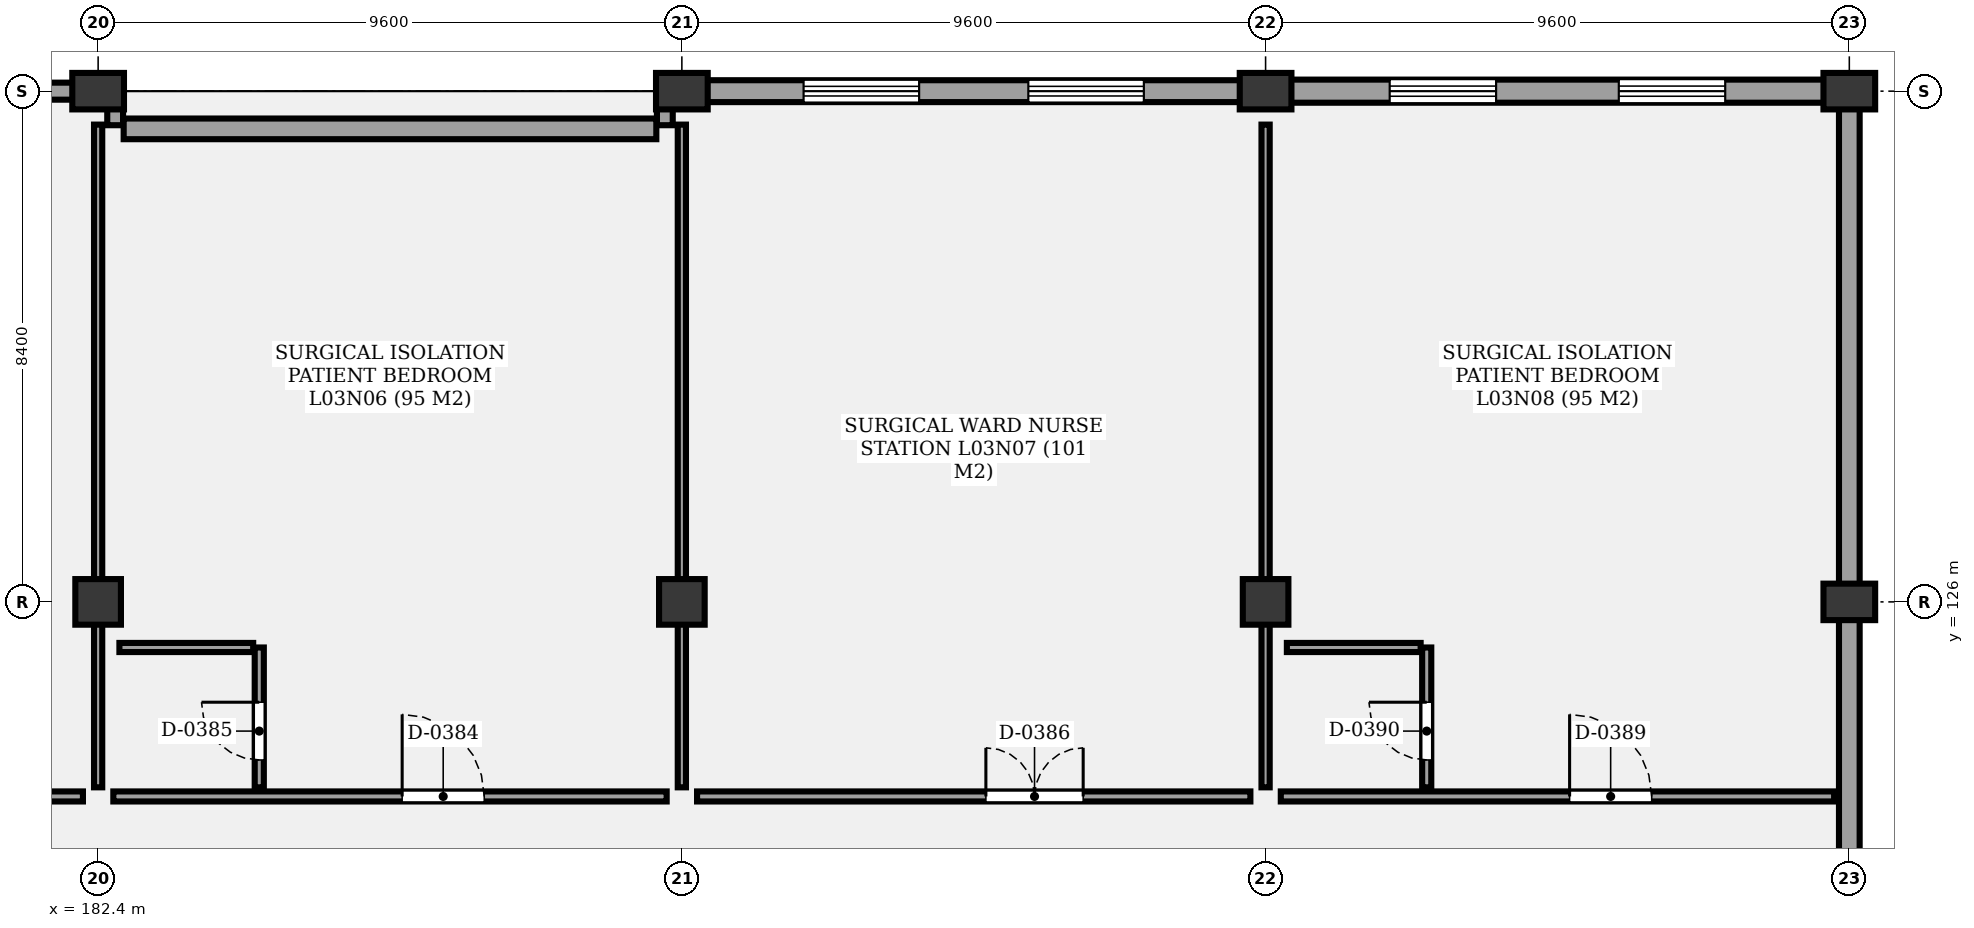
"""IFC4 building model, lengths in metres.
Left out: names, types, materials, properties, quantities, classifications, styles, units other than length and angle.
Written with IfcOpenShell. Run it as: python <this file> out.ifc"""

import sys

from ifc_helpers import new_model, si_unit, direction, frame, frame_2d, origin, origin_2d, place, context, subcontext, project, spatial, rectangle, extrude, element, fill, save


model = new_model("IFC4")
c1 = context("Model", 3, precision=1e-05, world=origin(), true_north=direction((0.0, 1.0)))
c2 = subcontext(c1, "Body", "Model", "MODEL_VIEW")
j1 = project(units=[si_unit("LENGTHUNIT", "METRE"), si_unit("PLANEANGLEUNIT", "RADIAN")], contexts=[c1])
p1 = place(None, origin())
s1 = spatial("IfcSite", under=j1, at=p1, CompositionType="ELEMENT")
p2 = place(p1, origin())
s2 = spatial("IfcBuilding", under=s1, at=p2, CompositionType="ELEMENT")
p3 = place(p2, frame((0.0, 0.0, 13.5)))
s3 = spatial("IfcBuildingStorey", under=s2, at=p3, CompositionType="ELEMENT", Elevation=13.5)
p4 = place(p3, frame((182.4, 126.0, 0.0), z_axis=(0.0, 0.0, 1.0), x_axis=(1.0, 0.0, 0.0)))
e1 = element("IfcColumn", 1, at=p4, inside=s3, PredefinedType="COLUMN", context=c2, shape_type="SweptSolid", body=[
    extrude(rectangle(XDim=0.75, YDim=0.75, at=origin_2d()), origin(), (0.0, 0.0, 1.0), 4.3),
])
p5 = place(p3, frame((182.4, 134.4, 0.0), z_axis=(0.0, 0.0, 1.0), x_axis=(1.0, 0.0, 0.0)))
e2 = element("IfcColumn", 2, at=p5, inside=s3, PredefinedType="COLUMN", context=c2, shape_type="SweptSolid", body=[
    extrude(rectangle(XDim=0.85, YDim=0.6, at=origin_2d()), origin(), (0.0, 0.0, 1.0), 4.3),
])
p6 = place(p3, frame((192.0, 126.0, 0.0), z_axis=(0.0, 0.0, 1.0), x_axis=(1.0, 0.0, 0.0)))
e3 = element("IfcColumn", 3, at=p6, inside=s3, PredefinedType="COLUMN", context=c2, shape_type="SweptSolid", body=[
    extrude(rectangle(XDim=0.75, YDim=0.75, at=origin_2d()), origin(), (0.0, 0.0, 1.0), 4.3),
])
p7 = place(p3, frame((192.0, 134.4, 0.0), z_axis=(0.0, 0.0, 1.0), x_axis=(1.0, 0.0, 0.0)))
e4 = element("IfcColumn", 4, at=p7, inside=s3, PredefinedType="COLUMN", context=c2, shape_type="SweptSolid", body=[
    extrude(rectangle(XDim=0.85, YDim=0.6, at=origin_2d()), origin(), (0.0, 0.0, 1.0), 4.3),
])
p8 = place(p3, frame((201.6, 126.0, 0.0), z_axis=(0.0, 0.0, 1.0), x_axis=(1.0, 0.0, 0.0)))
e5 = element("IfcColumn", 5, at=p8, inside=s3, PredefinedType="COLUMN", context=c2, shape_type="SweptSolid", body=[
    extrude(rectangle(XDim=0.75, YDim=0.75, at=origin_2d()), origin(), (0.0, 0.0, 1.0), 4.3),
])
for number, where, z_axis, x_axis in (
    (6, (201.6, 134.4, 0.0), (0.0, 0.0, 1.0), (1.0, 0.0, 0.0)),
    (7, (211.2, 126.0, 0.0), (0.0, 0.0, 1.0), (1.0, 0.0, 0.0)),
    (8, (211.2, 134.4, 0.0), (0.0, 0.0, 1.0), (1.0, 0.0, 0.0)),
):
    element("IfcColumn", number, at=place(p3, frame(where, z_axis=z_axis, x_axis=x_axis)), inside=s3, PredefinedType="COLUMN", context=c2, shape_type="SweptSolid", body=[
        extrude(rectangle(XDim=0.85, YDim=0.6, at=origin_2d()), origin(), (0.0, 0.0, 1.0), 4.3),
    ])
p9 = place(p3, frame((172.8, 134.4, 0.0), z_axis=(0.0, 0.0, 1.0), x_axis=(1.0, 0.0, 0.0)))
e9 = element("IfcWall", 9, at=p9, inside=s3, PredefinedType="SOLIDWALL", context=c2, shape_type="SweptSolid", body=[
    extrude(rectangle(XDim=9.6, YDim=0.28, at=frame_2d((4.8, 0.0))), origin(), (0.0, 0.0, 1.0), 3.49),
])
p10 = place(p9, frame((2.002, 0.0, 0.85)))
e10 = element("IfcOpeningElement", 10, at=p10, cuts=e9, PredefinedType="OPENING", context=c2, shape_type="SweptSolid", body=[
    extrude(rectangle(XDim=1.9, YDim=1.2, at=frame_2d((0.95, 0.6))), frame((0.0, 0.15, 0.0), z_axis=(0.0, -1.0, 0.0), x_axis=(1.0, 0.0, 0.0)), (0.0, 0.0, 1.0), 0.3),
])
p11 = place(p9, frame((5.698, 0.0, 0.85)))
e11 = element("IfcOpeningElement", 11, at=p11, cuts=e9, PredefinedType="OPENING", context=c2, shape_type="SweptSolid", body=[
    extrude(rectangle(XDim=1.9, YDim=1.2, at=frame_2d((0.95, 0.6))), frame((0.0, 0.15, 0.0), z_axis=(0.0, -1.0, 0.0), x_axis=(1.0, 0.0, 0.0)), (0.0, 0.0, 1.0), 0.3),
])
for number, where, z_axis, x_axis in (
    (12, (182.68, 134.2, 0.0), (0.0, 0.0, 1.0), (0.0, -1.0, 0.0)),
    (13, (191.72, 134.2, 0.0), (0.0, 0.0, 1.0), (0.0, -1.0, 0.0)),
):
    element("IfcWall", number, at=place(p3, frame(where, z_axis=z_axis, x_axis=x_axis)), inside=s3, PredefinedType="SOLIDWALL", context=c2, shape_type="SweptSolid", body=[
        extrude(rectangle(XDim=0.36, YDim=0.26, at=frame_2d((0.18, 0.0))), origin(), (0.0, 0.0, 1.0), 3.49),
    ])
p12 = place(p3, frame((182.82, 133.78, 0.0), z_axis=(0.0, 0.0, 1.0), x_axis=(1.0, 0.0, 0.0)))
e14 = element("IfcWall", 14, at=p12, inside=s3, PredefinedType="SOLIDWALL", context=c2, shape_type="SweptSolid", body=[
    extrude(rectangle(XDim=8.76, YDim=0.34, at=frame_2d((4.38, 0.0))), origin(), (0.0, 0.0, 1.0), 3.49),
])
p13 = place(p3, frame((192.0, 134.4, 0.0), z_axis=(0.0, 0.0, 1.0), x_axis=(1.0, 0.0, 0.0)))
e15 = element("IfcWall", 15, at=p13, inside=s3, PredefinedType="SOLIDWALL", context=c2, shape_type="SweptSolid", body=[
    extrude(rectangle(XDim=9.6, YDim=0.36, at=frame_2d((4.8, 0.0))), origin(), (0.0, 0.0, 1.0), 3.49),
])
p14 = place(p13, frame((2.002, 0.0, 0.85)))
e16 = element("IfcOpeningElement", 16, at=p14, cuts=e15, PredefinedType="OPENING", context=c2, shape_type="SweptSolid", body=[
    extrude(rectangle(XDim=1.9, YDim=1.2, at=frame_2d((0.95, 0.6))), frame((0.0, 0.19, 0.0), z_axis=(0.0, -1.0, 0.0), x_axis=(1.0, 0.0, 0.0)), (0.0, 0.0, 1.0), 0.38),
])
p15 = place(p13, frame((5.698, 0.0, 0.85)))
e17 = element("IfcOpeningElement", 17, at=p15, cuts=e15, PredefinedType="OPENING", context=c2, shape_type="SweptSolid", body=[
    extrude(rectangle(XDim=1.9, YDim=1.2, at=frame_2d((0.95, 0.6))), frame((0.0, 0.19, 0.0), z_axis=(0.0, -1.0, 0.0), x_axis=(1.0, 0.0, 0.0)), (0.0, 0.0, 1.0), 0.38),
])
p16 = place(p3, frame((201.6, 134.4, 0.0), z_axis=(0.0, 0.0, 1.0), x_axis=(1.0, 0.0, 0.0)))
e18 = element("IfcWall", 18, at=p16, inside=s3, PredefinedType="SOLIDWALL", context=c2, shape_type="SweptSolid", body=[
    extrude(rectangle(XDim=9.6, YDim=0.38, at=frame_2d((4.8, 0.0))), origin(), (0.0, 0.0, 1.0), 3.49),
])
p17 = place(p16, frame((2.041, 0.0, 0.85)))
e19 = element("IfcOpeningElement", 19, at=p17, cuts=e18, PredefinedType="OPENING", context=c2, shape_type="SweptSolid", body=[
    extrude(rectangle(XDim=1.75, YDim=1.2, at=frame_2d((0.875, 0.6))), frame((0.0, 0.2, 0.0), z_axis=(0.0, -1.0, 0.0), x_axis=(1.0, 0.0, 0.0)), (0.0, 0.0, 1.0), 0.4),
])
p18 = place(p16, frame((5.809, 0.0, 0.85)))
e20 = element("IfcOpeningElement", 20, at=p18, cuts=e18, PredefinedType="OPENING", context=c2, shape_type="SweptSolid", body=[
    extrude(rectangle(XDim=1.75, YDim=1.2, at=frame_2d((0.875, 0.6))), frame((0.0, 0.2, 0.0), z_axis=(0.0, -1.0, 0.0), x_axis=(1.0, 0.0, 0.0)), (0.0, 0.0, 1.0), 0.4),
])
p19 = place(p3, frame((211.2, 134.24, 0.0), z_axis=(0.0, 0.0, 1.0), x_axis=(0.0, -1.0, 0.0)))
e21 = element("IfcWall", 21, at=p19, inside=s3, PredefinedType="SOLIDWALL", context=c2, shape_type="SweptSolid", body=[
    extrude(rectangle(XDim=33.28, YDim=0.34, at=frame_2d((16.64, 0.0))), origin(), (0.0, 0.0, 1.0), 3.49),
])
p20 = place(p3, frame((173.05, 122.8, 0.0), z_axis=(0.0, 0.0, 1.0), x_axis=(1.0, 0.0, 0.0)))
e22 = element("IfcWall", 22, at=p20, inside=s3, PredefinedType="PARTITIONING", context=c2, shape_type="SweptSolid", body=[
    extrude(rectangle(XDim=9.1, YDim=0.165, at=frame_2d((4.55, 0.0))), origin(), (0.0, 0.0, 1.0), 3.4),
])
p21 = place(p20, frame((4.75, 0.0, 0.0)))
e23 = element("IfcOpeningElement", 23, at=p21, cuts=e22, PredefinedType="OPENING", context=c2, shape_type="SweptSolid", body=[
    extrude(rectangle(XDim=1.6, YDim=2.2, at=frame_2d((0.8, 1.1))), frame((0.0, 0.093, 0.0), z_axis=(0.0, -1.0, 0.0), x_axis=(1.0, 0.0, 0.0)), (0.0, 0.0, 1.0), 0.185),
])
p22 = place(p3, frame((182.65, 122.8, 0.0), z_axis=(0.0, 0.0, 1.0), x_axis=(1.0, 0.0, 0.0)))
e24 = element("IfcWall", 24, at=p22, inside=s3, PredefinedType="PARTITIONING", context=c2, shape_type="SweptSolid", body=[
    extrude(rectangle(XDim=9.1, YDim=0.165, at=frame_2d((4.55, 0.0))), origin(), (0.0, 0.0, 1.0), 3.4),
])
p23 = place(p22, frame((4.75, 0.0, 0.0)))
e25 = element("IfcOpeningElement", 25, at=p23, cuts=e24, PredefinedType="OPENING", context=c2, shape_type="SweptSolid", body=[
    extrude(rectangle(XDim=1.35, YDim=2.4, at=frame_2d((0.675, 1.2))), frame((0.0, 0.093, 0.0), z_axis=(0.0, -1.0, 0.0), x_axis=(1.0, 0.0, 0.0)), (0.0, 0.0, 1.0), 0.185),
])
p24 = place(p3, frame((185.05, 122.95, 0.0), z_axis=(0.0, 0.0, 1.0), x_axis=(0.0, 1.0, 0.0)))
e26 = element("IfcWall", 26, at=p24, inside=s3, PredefinedType="PARTITIONING", context=c2, shape_type="SweptSolid", body=[
    extrude(rectangle(XDim=2.3, YDim=0.15, at=frame_2d((1.15, 0.0))), origin(), (0.0, 0.0, 1.0), 3.4),
])
p25 = place(p24, frame((0.45, 0.0, 0.0)))
e27 = element("IfcOpeningElement", 27, at=p25, cuts=e26, PredefinedType="OPENING", context=c2, shape_type="SweptSolid", body=[
    extrude(rectangle(XDim=0.95, YDim=2.1, at=frame_2d((0.475, 1.05))), frame((0.0, 0.085, 0.0), z_axis=(0.0, -1.0, 0.0), x_axis=(1.0, 0.0, 0.0)), (0.0, 0.0, 1.0), 0.17),
])
p26 = place(p3, frame((182.75, 125.25, 0.0), z_axis=(0.0, 0.0, 1.0), x_axis=(1.0, 0.0, 0.0)))
e28 = element("IfcWall", 28, at=p26, inside=s3, PredefinedType="PARTITIONING", context=c2, shape_type="SweptSolid", body=[
    extrude(rectangle(XDim=2.2, YDim=0.15, at=frame_2d((1.1, 0.0))), origin(), (0.0, 0.0, 1.0), 3.4),
])
p27 = place(p3, frame((182.4, 122.95, 0.0), z_axis=(0.0, 0.0, 1.0), x_axis=(0.0, 1.0, 0.0)))
e29 = element("IfcWall", 29, at=p27, inside=s3, PredefinedType="PARTITIONING", context=c2, shape_type="SweptSolid", body=[
    extrude(rectangle(XDim=10.9, YDim=0.135, at=frame_2d((5.45, 0.0))), origin(), (0.0, 0.0, 1.0), 3.4),
])
p28 = place(p3, frame((192.25, 122.8, 0.0), z_axis=(0.0, 0.0, 1.0), x_axis=(1.0, 0.0, 0.0)))
e30 = element("IfcWall", 30, at=p28, inside=s3, PredefinedType="PARTITIONING", context=c2, shape_type="SweptSolid", body=[
    extrude(rectangle(XDim=9.1, YDim=0.165, at=frame_2d((4.55, 0.0))), origin(), (0.0, 0.0, 1.0), 3.4),
])
p29 = place(p28, frame((4.75, 0.0, 0.0)))
e31 = element("IfcOpeningElement", 31, at=p29, cuts=e30, PredefinedType="OPENING", context=c2, shape_type="SweptSolid", body=[
    extrude(rectangle(XDim=1.6, YDim=2.2, at=frame_2d((0.8, 1.1))), frame((0.0, 0.093, 0.0), z_axis=(0.0, -1.0, 0.0), x_axis=(1.0, 0.0, 0.0)), (0.0, 0.0, 1.0), 0.185),
])
p30 = place(p3, frame((192.0, 122.95, 0.0), z_axis=(0.0, 0.0, 1.0), x_axis=(0.0, 1.0, 0.0)))
e32 = element("IfcWall", 32, at=p30, inside=s3, PredefinedType="PARTITIONING", context=c2, shape_type="SweptSolid", body=[
    extrude(rectangle(XDim=10.9, YDim=0.135, at=frame_2d((5.45, 0.0))), origin(), (0.0, 0.0, 1.0), 3.4),
])
p31 = place(p3, frame((201.85, 122.8, 0.0), z_axis=(0.0, 0.0, 1.0), x_axis=(1.0, 0.0, 0.0)))
e33 = element("IfcWall", 33, at=p31, inside=s3, PredefinedType="PARTITIONING", context=c2, shape_type="SweptSolid", body=[
    extrude(rectangle(XDim=9.1, YDim=0.165, at=frame_2d((4.55, 0.0))), origin(), (0.0, 0.0, 1.0), 3.4),
])
p32 = place(p31, frame((4.75, 0.0, 0.0)))
e34 = element("IfcOpeningElement", 34, at=p32, cuts=e33, PredefinedType="OPENING", context=c2, shape_type="SweptSolid", body=[
    extrude(rectangle(XDim=1.35, YDim=2.4, at=frame_2d((0.675, 1.2))), frame((0.0, 0.093, 0.0), z_axis=(0.0, -1.0, 0.0), x_axis=(1.0, 0.0, 0.0)), (0.0, 0.0, 1.0), 0.185),
])
p33 = place(p3, frame((204.25, 122.95, 0.0), z_axis=(0.0, 0.0, 1.0), x_axis=(0.0, 1.0, 0.0)))
e35 = element("IfcWall", 35, at=p33, inside=s3, PredefinedType="PARTITIONING", context=c2, shape_type="SweptSolid", body=[
    extrude(rectangle(XDim=2.3, YDim=0.15, at=frame_2d((1.15, 0.0))), origin(), (0.0, 0.0, 1.0), 3.4),
])
p34 = place(p33, frame((0.45, 0.0, 0.0)))
e36 = element("IfcOpeningElement", 36, at=p34, cuts=e35, PredefinedType="OPENING", context=c2, shape_type="SweptSolid", body=[
    extrude(rectangle(XDim=0.95, YDim=2.1, at=frame_2d((0.475, 1.05))), frame((0.0, 0.085, 0.0), z_axis=(0.0, -1.0, 0.0), x_axis=(1.0, 0.0, 0.0)), (0.0, 0.0, 1.0), 0.17),
])
p35 = place(p3, frame((201.95, 125.25, 0.0), z_axis=(0.0, 0.0, 1.0), x_axis=(1.0, 0.0, 0.0)))
e37 = element("IfcWall", 37, at=p35, inside=s3, PredefinedType="PARTITIONING", context=c2, shape_type="SweptSolid", body=[
    extrude(rectangle(XDim=2.2, YDim=0.15, at=frame_2d((1.1, 0.0))), origin(), (0.0, 0.0, 1.0), 3.4),
])
p36 = place(p3, frame((201.6, 122.95, 0.0), z_axis=(0.0, 0.0, 1.0), x_axis=(0.0, 1.0, 0.0)))
e38 = element("IfcWall", 38, at=p36, inside=s3, PredefinedType="PARTITIONING", context=c2, shape_type="SweptSolid", body=[
    extrude(rectangle(XDim=10.9, YDim=0.135, at=frame_2d((5.45, 0.0))), origin(), (0.0, 0.0, 1.0), 3.4),
])
p37 = place(p14, origin())
e39 = element("IfcWindow", 39, at=p37, inside=s3, PartitioningType="SINGLE_PANEL", PredefinedType="WINDOW", context=c2, shape_type="SweptSolid", body=[
    extrude(rectangle(XDim=1.9, YDim=1.2, at=frame_2d((0.95, 0.6))), frame((0.0, 0.03, 0.0), z_axis=(0.0, -1.0, 0.0), x_axis=(1.0, 0.0, 0.0)), (0.0, 0.0, 1.0), 0.06),
])
fill(e16, e39)
p38 = place(p15, origin())
e40 = element("IfcWindow", 40, at=p38, inside=s3, PartitioningType="SINGLE_PANEL", PredefinedType="WINDOW", context=c2, shape_type="SweptSolid", body=[
    extrude(rectangle(XDim=1.9, YDim=1.2, at=frame_2d((0.95, 0.6))), frame((0.0, 0.03, 0.0), z_axis=(0.0, -1.0, 0.0), x_axis=(1.0, 0.0, 0.0)), (0.0, 0.0, 1.0), 0.06),
])
fill(e17, e40)
p39 = place(p17, origin())
e41 = element("IfcWindow", 41, at=p39, inside=s3, PartitioningType="SINGLE_PANEL", PredefinedType="WINDOW", context=c2, shape_type="SweptSolid", body=[
    extrude(rectangle(XDim=1.75, YDim=1.2, at=frame_2d((0.875, 0.6))), frame((0.0, 0.03, 0.0), z_axis=(0.0, -1.0, 0.0), x_axis=(1.0, 0.0, 0.0)), (0.0, 0.0, 1.0), 0.06),
])
fill(e19, e41)
p40 = place(p18, origin())
e42 = element("IfcWindow", 42, at=p40, inside=s3, PartitioningType="SINGLE_PANEL", PredefinedType="WINDOW", context=c2, shape_type="SweptSolid", body=[
    extrude(rectangle(XDim=1.75, YDim=1.2, at=frame_2d((0.875, 0.6))), frame((0.0, 0.03, 0.0), z_axis=(0.0, -1.0, 0.0), x_axis=(1.0, 0.0, 0.0)), (0.0, 0.0, 1.0), 0.06),
])
fill(e20, e42)
p41 = place(p23, origin())
e43 = element("IfcDoor", 43, at=p41, inside=s3, OperationType="SINGLE_SWING_LEFT", PredefinedType="DOOR", context=c2, shape_type="SweptSolid", body=[
    extrude(rectangle(XDim=1.35, YDim=2.4, at=frame_2d((0.675, 1.2))), frame((0.0, 0.025, 0.0), z_axis=(0.0, -1.0, 0.0), x_axis=(1.0, 0.0, 0.0)), (0.0, 0.0, 1.0), 0.05),
])
fill(e25, e43)
p42 = place(p25, origin())
e44 = element("IfcDoor", 44, at=p42, inside=s3, OperationType="SINGLE_SWING_RIGHT", PredefinedType="DOOR", context=c2, shape_type="SweptSolid", body=[
    extrude(rectangle(XDim=0.95, YDim=2.1, at=frame_2d((0.475, 1.05))), frame((0.0, 0.025, 0.0), z_axis=(0.0, -1.0, 0.0), x_axis=(1.0, 0.0, 0.0)), (0.0, 0.0, 1.0), 0.05),
])
fill(e27, e44)
p43 = place(p29, origin())
e45 = element("IfcDoor", 45, at=p43, inside=s3, OperationType="DOUBLE_DOOR_SINGLE_SWING", PredefinedType="DOOR", context=c2, shape_type="SweptSolid", body=[
    extrude(rectangle(XDim=1.6, YDim=2.2, at=frame_2d((0.8, 1.1))), frame((0.0, 0.025, 0.0), z_axis=(0.0, -1.0, 0.0), x_axis=(1.0, 0.0, 0.0)), (0.0, 0.0, 1.0), 0.05),
])
fill(e31, e45)
p44 = place(p32, origin())
e46 = element("IfcDoor", 46, at=p44, inside=s3, OperationType="SINGLE_SWING_LEFT", PredefinedType="DOOR", context=c2, shape_type="SweptSolid", body=[
    extrude(rectangle(XDim=1.35, YDim=2.4, at=frame_2d((0.675, 1.2))), frame((0.0, 0.025, 0.0), z_axis=(0.0, -1.0, 0.0), x_axis=(1.0, 0.0, 0.0)), (0.0, 0.0, 1.0), 0.05),
])
fill(e34, e46)
p45 = place(p34, origin())
e47 = element("IfcDoor", 47, at=p45, inside=s3, OperationType="SINGLE_SWING_RIGHT", PredefinedType="DOOR", context=c2, shape_type="SweptSolid", body=[
    extrude(rectangle(XDim=0.95, YDim=2.1, at=frame_2d((0.475, 1.05))), frame((0.0, 0.025, 0.0), z_axis=(0.0, -1.0, 0.0), x_axis=(1.0, 0.0, 0.0)), (0.0, 0.0, 1.0), 0.05),
])
fill(e36, e47)
save(model, sys.argv[1])
